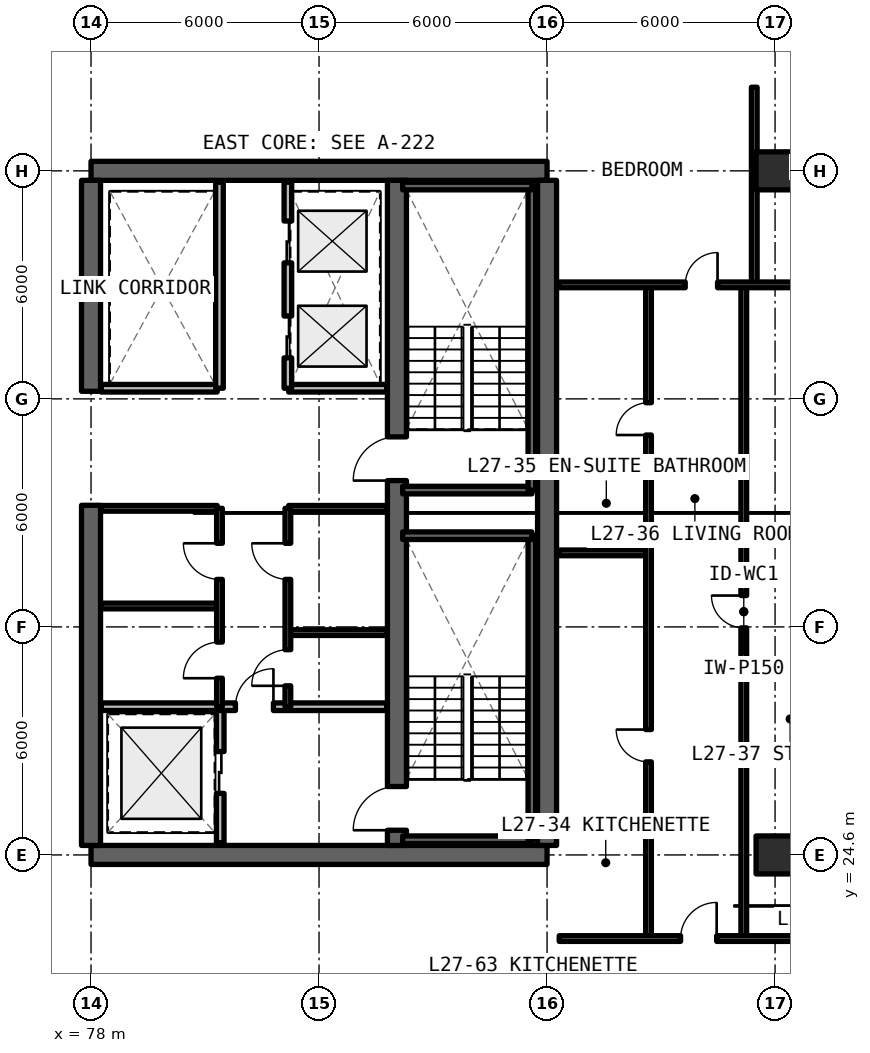
"""IFC4 building model, lengths in metres.
Left out: names, types, materials, properties, quantities, classifications, styles, units other than length and angle.
Written with IfcOpenShell. Run it as: python <this file> out.ifc"""

import sys

from ifc_helpers import new_model, si_unit, direction, frame, frame_2d, origin, origin_2d, place, context, subcontext, project, spatial, rectangle, extrude, element, fill, save


model = new_model("IFC4")
c1 = context("Model", 3, precision=1e-05, world=origin(), true_north=direction((0.0, 1.0)))
c2 = subcontext(c1, "Body", "Model", "MODEL_VIEW")
j1 = project(units=[si_unit("LENGTHUNIT", "METRE"), si_unit("PLANEANGLEUNIT", "RADIAN")], contexts=[c1])
p1 = place(None, origin())
s1 = spatial("IfcSite", under=j1, at=p1, CompositionType="ELEMENT")
p2 = place(p1, origin())
s2 = spatial("IfcBuilding", under=s1, at=p2, CompositionType="ELEMENT")
p3 = place(p2, frame((0.0, 0.0, 98.67)))
s3 = spatial("IfcBuildingStorey", under=s2, at=p3, CompositionType="ELEMENT", Elevation=98.67)
for number, where, z_axis, x_axis in (
    (1, (78.0, 24.6, 0.0), (0.0, 0.0, 1.0), (1.0, 0.0, 0.0)),
    (2, (90.0, 42.6, 0.0), (0.0, 0.0, 1.0), (-1.0, 0.0, 0.0)),
):
    element("IfcWall", number, at=place(p3, frame(where, z_axis=z_axis, x_axis=x_axis)), inside=s3, PredefinedType="SHEAR", context=c2, shape_type="SweptSolid", body=[
        extrude(rectangle(XDim=12.0, YDim=0.5, at=frame_2d((6.0, 0.0))), origin(), (0.0, 0.0, 1.0), 3.3),
    ])
p4 = place(p3, frame((90.0, 24.85, 0.0), z_axis=(0.0, 0.0, 1.0), x_axis=(0.0, 1.0, 0.0)))
e3 = element("IfcWall", 3, at=p4, inside=s3, PredefinedType="SHEAR", context=c2, shape_type="SweptSolid", body=[
    extrude(rectangle(XDim=17.5, YDim=0.5, at=frame_2d((8.75, 0.0))), origin(), (0.0, 0.0, 1.0), 3.3),
])
p5 = place(p3, frame((78.0, 24.85, 0.0), z_axis=(0.0, 0.0, 1.0), x_axis=(0.0, 1.0, 0.0)))
e4 = element("IfcWall", 4, at=p5, inside=s3, PredefinedType="SHEAR", context=c2, shape_type="SweptSolid", body=[
    extrude(rectangle(XDim=8.95, YDim=0.5, at=frame_2d((4.475, 0.0))), origin(), (0.0, 0.0, 1.0), 3.3),
])
p6 = place(p3, frame((78.0, 36.8, 0.0), z_axis=(0.0, 0.0, 1.0), x_axis=(0.0, 1.0, 0.0)))
e5 = element("IfcWall", 5, at=p6, inside=s3, PredefinedType="SHEAR", context=c2, shape_type="SweptSolid", body=[
    extrude(rectangle(XDim=5.55, YDim=0.5, at=frame_2d((2.775, 0.0))), origin(), (0.0, 0.0, 1.0), 3.3),
])
p7 = place(p3, frame((86.05, 24.85, 0.0), z_axis=(0.0, 0.0, 1.0), x_axis=(0.0, 1.0, 0.0)))
e6 = element("IfcWall", 6, at=p7, inside=s3, PredefinedType="SHEAR", context=c2, shape_type="SweptSolid", body=[
    extrude(rectangle(XDim=17.5, YDim=0.5, at=frame_2d((8.75, 0.0))), origin(), (0.0, 0.0, 1.0), 3.3),
])
p8 = place(p7, frame((0.4, 0.0, 0.0)))
e7 = element("IfcOpeningElement", 7, at=p8, cuts=e6, PredefinedType="OPENING", context=c2, shape_type="SweptSolid", body=[
    extrude(rectangle(XDim=1.15, YDim=2.15, at=frame_2d((0.575, 1.075))), frame((0.0, 0.26, 0.0), z_axis=(0.0, -1.0, 0.0), x_axis=(1.0, 0.0, 0.0)), (0.0, 0.0, 1.0), 0.52),
])
p9 = place(p7, frame((9.6, 0.0, 0.0)))
e8 = element("IfcOpeningElement", 8, at=p9, cuts=e6, PredefinedType="OPENING", context=c2, shape_type="SweptSolid", body=[
    extrude(rectangle(XDim=1.15, YDim=2.15, at=frame_2d((0.575, 1.075))), frame((0.0, 0.26, 0.0), z_axis=(0.0, -1.0, 0.0), x_axis=(1.0, 0.0, 0.0)), (0.0, 0.0, 1.0), 0.52),
])
for number, where, z_axis, x_axis in (
    (9, (96.0, 24.6, 0.0), (0.0, 0.0, 1.0), (1.0, 0.0, 0.0)),
    (10, (96.0, 42.6, 0.0), (0.0, 0.0, 1.0), (1.0, 0.0, 0.0)),
):
    element("IfcColumn", number, at=place(p3, frame(where, z_axis=z_axis, x_axis=x_axis)), inside=s3, PredefinedType="COLUMN", context=c2, shape_type="SweptSolid", body=[
        extrude(rectangle(XDim=1.0, YDim=1.0, at=origin_2d()), origin(), (0.0, 0.0, 1.0), 3.3),
    ])
p10 = place(p3, frame((81.4, 24.92, 0.0), z_axis=(0.0, 0.0, 1.0), x_axis=(0.0, 1.0, 0.0)))
e11 = element("IfcWall", 11, at=p10, inside=s3, PredefinedType="SOLIDWALL", context=c2, shape_type="SweptSolid", body=[
    extrude(rectangle(XDim=3.58, YDim=0.2, at=frame_2d((1.79, 0.0))), origin(), (0.0, 0.0, 1.0), 2.35),
])
p11 = place(p10, frame((1.3, 0.0, 0.0)))
e12 = element("IfcOpeningElement", 12, at=p11, cuts=e11, PredefinedType="OPENING", context=c2, shape_type="SweptSolid", body=[
    extrude(rectangle(XDim=1.1, YDim=2.2, at=frame_2d((0.55, 1.1))), frame((0.0, 0.11, 0.0), z_axis=(0.0, -1.0, 0.0), x_axis=(1.0, 0.0, 0.0)), (0.0, 0.0, 1.0), 0.22),
])
p12 = place(p3, frame((78.27, 28.5, 0.0), z_axis=(0.0, 0.0, 1.0), x_axis=(1.0, 0.0, 0.0)))
e13 = element("IfcWall", 13, at=p12, inside=s3, PredefinedType="SOLIDWALL", context=c2, shape_type="SweptSolid", body=[
    extrude(rectangle(XDim=7.51, YDim=0.2, at=frame_2d((3.755, 0.0))), origin(), (0.0, 0.0, 1.0), 2.35),
])
p13 = place(p12, frame((3.53, 0.0, 0.0)))
e14 = element("IfcOpeningElement", 14, at=p13, cuts=e13, PredefinedType="OPENING", context=c2, shape_type="SweptSolid", body=[
    extrude(rectangle(XDim=1.0, YDim=2.15, at=frame_2d((0.5, 1.075))), frame((0.0, 0.11, 0.0), z_axis=(0.0, -1.0, 0.0), x_axis=(1.0, 0.0, 0.0)), (0.0, 0.0, 1.0), 0.22),
])
for number, where, z_axis, x_axis in (
    (15, (83.2, 30.45, 0.0), (0.0, 0.0, 1.0), (1.0, 0.0, 0.0)),
    (16, (83.2, 33.72, 0.0), (0.0, 0.0, 1.0), (1.0, 0.0, 0.0)),
):
    element("IfcWall", number, at=place(p3, frame(where, z_axis=z_axis, x_axis=x_axis)), inside=s3, PredefinedType="SOLIDWALL", context=c2, shape_type="SweptSolid", body=[
        extrude(rectangle(XDim=2.58, YDim=0.15, at=frame_2d((1.29, 0.0))), origin(), (0.0, 0.0, 1.0), 2.35),
    ])
p14 = place(p3, frame((83.18, 28.5, 0.0), z_axis=(0.0, 0.0, 1.0), x_axis=(0.0, 1.0, 0.0)))
e17 = element("IfcWall", 17, at=p14, inside=s3, PredefinedType="SOLIDWALL", context=c2, shape_type="SweptSolid", body=[
    extrude(rectangle(XDim=5.22, YDim=0.15, at=frame_2d((2.61, 0.0))), origin(), (0.0, 0.0, 1.0), 2.35),
])
p15 = place(p14, frame((0.55, 0.0, 0.0)))
e18 = element("IfcOpeningElement", 18, at=p15, cuts=e17, PredefinedType="OPENING", context=c2, shape_type="SweptSolid", body=[
    extrude(rectangle(XDim=0.95, YDim=2.15, at=frame_2d((0.475, 1.075))), frame((0.0, 0.085, 0.0), z_axis=(0.0, -1.0, 0.0), x_axis=(1.0, 0.0, 0.0)), (0.0, 0.0, 1.0), 0.17),
])
p16 = place(p14, frame((3.35, 0.0, 0.0)))
e19 = element("IfcOpeningElement", 19, at=p16, cuts=e17, PredefinedType="OPENING", context=c2, shape_type="SweptSolid", body=[
    extrude(rectangle(XDim=0.95, YDim=2.15, at=frame_2d((0.475, 1.075))), frame((0.0, 0.085, 0.0), z_axis=(0.0, -1.0, 0.0), x_axis=(1.0, 0.0, 0.0)), (0.0, 0.0, 1.0), 0.17),
])
for number, where, z_axis, x_axis in (
    (20, (78.27, 31.15, 0.0), (0.0, 0.0, 1.0), (1.0, 0.0, 0.0)),
    (21, (78.27, 33.72, 0.0), (0.0, 0.0, 1.0), (1.0, 0.0, 0.0)),
):
    element("IfcWall", number, at=place(p3, frame(where, z_axis=z_axis, x_axis=x_axis)), inside=s3, PredefinedType="SOLIDWALL", context=c2, shape_type="SweptSolid", body=[
        extrude(rectangle(XDim=3.05, YDim=0.15, at=frame_2d((1.525, 0.0))), origin(), (0.0, 0.0, 1.0), 2.35),
    ])
p17 = place(p3, frame((81.38, 28.5, 0.0), z_axis=(0.0, 0.0, 1.0), x_axis=(0.0, 1.0, 0.0)))
e22 = element("IfcWall", 22, at=p17, inside=s3, PredefinedType="SOLIDWALL", context=c2, shape_type="SweptSolid", body=[
    extrude(rectangle(XDim=5.22, YDim=0.15, at=frame_2d((2.61, 0.0))), origin(), (0.0, 0.0, 1.0), 2.35),
])
p18 = place(p17, frame((0.75, 0.0, 0.0)))
e23 = element("IfcOpeningElement", 23, at=p18, cuts=e22, PredefinedType="OPENING", context=c2, shape_type="SweptSolid", body=[
    extrude(rectangle(XDim=0.95, YDim=2.15, at=frame_2d((0.475, 1.075))), frame((0.0, 0.085, 0.0), z_axis=(0.0, -1.0, 0.0), x_axis=(1.0, 0.0, 0.0)), (0.0, 0.0, 1.0), 0.17),
])
p19 = place(p17, frame((3.35, 0.0, 0.0)))
e24 = element("IfcOpeningElement", 24, at=p19, cuts=e22, PredefinedType="OPENING", context=c2, shape_type="SweptSolid", body=[
    extrude(rectangle(XDim=0.95, YDim=2.15, at=frame_2d((0.475, 1.075))), frame((0.0, 0.085, 0.0), z_axis=(0.0, -1.0, 0.0), x_axis=(1.0, 0.0, 0.0)), (0.0, 0.0, 1.0), 0.17),
])
p20 = place(p3, frame((83.2, 36.88, 0.0), z_axis=(0.0, 0.0, 1.0), x_axis=(1.0, 0.0, 0.0)))
e25 = element("IfcWall", 25, at=p20, inside=s3, PredefinedType="SOLIDWALL", context=c2, shape_type="SweptSolid", body=[
    extrude(rectangle(XDim=2.58, YDim=0.2, at=frame_2d((1.29, 0.0))), origin(), (0.0, 0.0, 1.0), 2.35),
])
p21 = place(p3, frame((83.18, 36.88, 0.0), z_axis=(0.0, 0.0, 1.0), x_axis=(0.0, 1.0, 0.0)))
e26 = element("IfcWall", 26, at=p21, inside=s3, PredefinedType="SOLIDWALL", context=c2, shape_type="SweptSolid", body=[
    extrude(rectangle(XDim=5.42, YDim=0.2, at=frame_2d((2.71, 0.0))), origin(), (0.0, 0.0, 1.0), 2.35),
])
p22 = place(p21, frame((0.8, 0.0, 0.0)))
e27 = element("IfcOpeningElement", 27, at=p22, cuts=e26, PredefinedType="OPENING", context=c2, shape_type="SweptSolid", body=[
    extrude(rectangle(XDim=1.1, YDim=2.2, at=frame_2d((0.55, 1.1))), frame((0.0, 0.11, 0.0), z_axis=(0.0, -1.0, 0.0), x_axis=(1.0, 0.0, 0.0)), (0.0, 0.0, 1.0), 0.22),
])
p23 = place(p21, frame((3.3, 0.0, 0.0)))
e28 = element("IfcOpeningElement", 28, at=p23, cuts=e26, PredefinedType="OPENING", context=c2, shape_type="SweptSolid", body=[
    extrude(rectangle(XDim=1.1, YDim=2.2, at=frame_2d((0.55, 1.1))), frame((0.0, 0.11, 0.0), z_axis=(0.0, -1.0, 0.0), x_axis=(1.0, 0.0, 0.0)), (0.0, 0.0, 1.0), 0.22),
])
p24 = place(p3, frame((78.27, 36.88, 0.0), z_axis=(0.0, 0.0, 1.0), x_axis=(1.0, 0.0, 0.0)))
e29 = element("IfcWall", 29, at=p24, inside=s3, PredefinedType="SOLIDWALL", context=c2, shape_type="SweptSolid", body=[
    extrude(rectangle(XDim=3.05, YDim=0.2, at=frame_2d((1.525, 0.0))), origin(), (0.0, 0.0, 1.0), 2.35),
])
p25 = place(p3, frame((81.38, 36.88, 0.0), z_axis=(0.0, 0.0, 1.0), x_axis=(0.0, 1.0, 0.0)))
e30 = element("IfcWall", 30, at=p25, inside=s3, PredefinedType="SOLIDWALL", context=c2, shape_type="SweptSolid", body=[
    extrude(rectangle(XDim=5.42, YDim=0.2, at=frame_2d((2.71, 0.0))), origin(), (0.0, 0.0, 1.0), 2.35),
])
p26 = place(p3, frame((95.177, 22.4, 0.0), z_axis=(0.0, 0.0, 1.0), x_axis=(0.0, 1.0, 0.0)))
e31 = element("IfcWall", 31, at=p26, inside=s3, PredefinedType="PARTITIONING", context=c2, shape_type="SweptSolid", body=[
    extrude(rectangle(XDim=17.2, YDim=0.15, at=frame_2d((8.6, 0.0))), origin(), (0.0, 0.0, 1.0), 2.35),
])
p27 = place(p26, frame((8.175, 0.0, 0.0)))
e32 = element("IfcOpeningElement", 32, at=p27, cuts=e31, PredefinedType="OPENING", context=c2, shape_type="SweptSolid", body=[
    extrude(rectangle(XDim=0.85, YDim=2.1, at=frame_2d((0.425, 1.05))), frame((0.0, 0.085, 0.0), z_axis=(0.0, -1.0, 0.0), x_axis=(1.0, 0.0, 0.0)), (0.0, 0.0, 1.0), 0.17),
])
p28 = place(p3, frame((90.32, 32.548, 0.0), z_axis=(0.0, 0.0, 1.0), x_axis=(1.0, 0.0, 0.0)))
e33 = element("IfcWall", 33, at=p28, inside=s3, PredefinedType="PARTITIONING", context=c2, shape_type="SweptSolid", body=[
    extrude(rectangle(XDim=2.35, YDim=0.15, at=frame_2d((1.175, 0.0))), origin(), (0.0, 0.0, 1.0), 2.35),
])
p29 = place(p3, frame((92.67, 22.4, 0.0), z_axis=(0.0, 0.0, 1.0), x_axis=(0.0, 1.0, 0.0)))
e34 = element("IfcWall", 34, at=p29, inside=s3, PredefinedType="PARTITIONING", context=c2, shape_type="SweptSolid", body=[
    extrude(rectangle(XDim=17.2, YDim=0.15, at=frame_2d((8.6, 0.0))), origin(), (0.0, 0.0, 1.0), 2.35),
])
p30 = place(p29, frame((4.649, 0.0, 0.0)))
e35 = element("IfcOpeningElement", 35, at=p30, cuts=e34, PredefinedType="OPENING", context=c2, shape_type="SweptSolid", body=[
    extrude(rectangle(XDim=0.85, YDim=2.1, at=frame_2d((0.425, 1.05))), frame((0.0, 0.085, 0.0), z_axis=(0.0, -1.0, 0.0), x_axis=(1.0, 0.0, 0.0)), (0.0, 0.0, 1.0), 0.17),
])
p31 = place(p29, frame((13.249, 0.0, 0.0)))
e36 = element("IfcOpeningElement", 36, at=p31, cuts=e34, PredefinedType="OPENING", context=c2, shape_type="SweptSolid", body=[
    extrude(rectangle(XDim=0.85, YDim=2.1, at=frame_2d((0.425, 1.05))), frame((0.0, 0.085, 0.0), z_axis=(0.0, -1.0, 0.0), x_axis=(1.0, 0.0, 0.0)), (0.0, 0.0, 1.0), 0.17),
])
p32 = place(p3, frame((95.452, 39.6, 0.0), z_axis=(0.0, 0.0, 1.0), x_axis=(0.0, 1.0, 0.0)))
e37 = element("IfcWall", 37, at=p32, inside=s3, PredefinedType="PARTITIONING", context=c2, shape_type="SweptSolid", body=[
    extrude(rectangle(XDim=5.2, YDim=0.15, at=frame_2d((2.6, 0.0))), origin(), (0.0, 0.0, 1.0), 2.35),
])
p33 = place(p3, frame((90.32, 39.6, 0.0), z_axis=(0.0, 0.0, 1.0), x_axis=(1.0, 0.0, 0.0)))
e38 = element("IfcWall", 38, at=p33, inside=s3, PredefinedType="PARTITIONING", context=c2, shape_type="SweptSolid", body=[
    extrude(rectangle(XDim=9.87, YDim=0.15, at=frame_2d((4.935, 0.0))), origin(), (0.0, 0.0, 1.0), 2.35),
])
p34 = place(p33, frame((3.316, 0.0, 0.0)))
e39 = element("IfcOpeningElement", 39, at=p34, cuts=e38, PredefinedType="OPENING", context=c2, shape_type="SweptSolid", body=[
    extrude(rectangle(XDim=0.85, YDim=2.1, at=frame_2d((0.425, 1.05))), frame((0.0, 0.085, 0.0), z_axis=(0.0, -1.0, 0.0), x_axis=(1.0, 0.0, 0.0)), (0.0, 0.0, 1.0), 0.17),
])
p35 = place(p33, frame((7.876, 0.0, 0.0)))
e40 = element("IfcOpeningElement", 40, at=p35, cuts=e38, PredefinedType="OPENING", context=c2, shape_type="SweptSolid", body=[
    extrude(rectangle(XDim=0.85, YDim=2.1, at=frame_2d((0.425, 1.05))), frame((0.0, 0.085, 0.0), z_axis=(0.0, -1.0, 0.0), x_axis=(1.0, 0.0, 0.0)), (0.0, 0.0, 1.0), 0.17),
])
p36 = place(p3, frame((90.32, 22.4, 0.0), z_axis=(0.0, 0.0, 1.0), x_axis=(1.0, 0.0, 0.0)))
e41 = element("IfcWall", 41, at=p36, inside=s3, PredefinedType="SOLIDWALL", context=c2, shape_type="SweptSolid", body=[
    extrude(rectangle(XDim=9.87, YDim=0.15, at=frame_2d((4.935, 0.0))), origin(), (0.0, 0.0, 1.0), 2.35),
])
p37 = place(p36, frame((3.193, 0.0, 0.0)))
e42 = element("IfcOpeningElement", 42, at=p37, cuts=e41, PredefinedType="OPENING", context=c2, shape_type="SweptSolid", body=[
    extrude(rectangle(XDim=0.95, YDim=2.15, at=frame_2d((0.475, 1.075))), frame((0.0, 0.085, 0.0), z_axis=(0.0, -1.0, 0.0), x_axis=(1.0, 0.0, 0.0)), (0.0, 0.0, 1.0), 0.17),
])
p38 = place(p3, frame((86.2, 25.0, 0.0), z_axis=(0.0, 0.0, 1.0), x_axis=(1.0, 0.0, 0.0)))
e43 = element("IfcWall", 43, at=p38, inside=s3, PredefinedType="SOLIDWALL", context=c2, shape_type="SweptSolid", body=[
    extrude(rectangle(XDim=3.4, YDim=0.2, at=frame_2d((1.7, 0.0))), origin(), (0.0, 0.0, 1.0), 3.3),
])
p39 = place(p3, frame((89.6, 25.0, 0.0), z_axis=(0.0, 0.0, 1.0), x_axis=(0.0, 1.0, 0.0)))
e44 = element("IfcWall", 44, at=p39, inside=s3, PredefinedType="SOLIDWALL", context=c2, shape_type="SweptSolid", body=[
    extrude(rectangle(XDim=8.0, YDim=0.2, at=frame_2d((4.0, 0.0))), origin(), (0.0, 0.0, 1.0), 3.3),
])
for number, where, z_axis, x_axis in (
    (45, (89.6, 33.0, 0.0), (0.0, 0.0, 1.0), (-1.0, 0.0, 0.0)),
    (46, (86.2, 34.2, 0.0), (0.0, 0.0, 1.0), (1.0, 0.0, 0.0)),
):
    element("IfcWall", number, at=place(p3, frame(where, z_axis=z_axis, x_axis=x_axis)), inside=s3, PredefinedType="SOLIDWALL", context=c2, shape_type="SweptSolid", body=[
        extrude(rectangle(XDim=3.4, YDim=0.2, at=frame_2d((1.7, 0.0))), origin(), (0.0, 0.0, 1.0), 3.3),
    ])
p40 = place(p3, frame((89.6, 34.2, 0.0), z_axis=(0.0, 0.0, 1.0), x_axis=(0.0, 1.0, 0.0)))
e47 = element("IfcWall", 47, at=p40, inside=s3, PredefinedType="SOLIDWALL", context=c2, shape_type="SweptSolid", body=[
    extrude(rectangle(XDim=8.0, YDim=0.2, at=frame_2d((4.0, 0.0))), origin(), (0.0, 0.0, 1.0), 3.3),
])
p41 = place(p3, frame((89.6, 42.2, 0.0), z_axis=(0.0, 0.0, 1.0), x_axis=(-1.0, 0.0, 0.0)))
e48 = element("IfcWall", 48, at=p41, inside=s3, PredefinedType="SOLIDWALL", context=c2, shape_type="SweptSolid", body=[
    extrude(rectangle(XDim=3.4, YDim=0.2, at=frame_2d((1.7, 0.0))), origin(), (0.0, 0.0, 1.0), 3.3),
])
p42 = place(p11, origin())
e49 = element("IfcDoor", 49, at=p42, inside=s3, OperationType="SLIDING_TO_LEFT", PredefinedType="DOOR", context=c2, shape_type="SweptSolid", body=[
    extrude(rectangle(XDim=1.1, YDim=2.2, at=frame_2d((0.55, 1.1))), frame((0.0, 0.025, 0.0), z_axis=(0.0, -1.0, 0.0), x_axis=(1.0, 0.0, 0.0)), (0.0, 0.0, 1.0), 0.05),
])
fill(e12, e49)
p43 = place(p13, origin())
e50 = element("IfcDoor", 50, at=p43, inside=s3, OperationType="SINGLE_SWING_RIGHT", PredefinedType="DOOR", context=c2, shape_type="SweptSolid", body=[
    extrude(rectangle(XDim=1.0, YDim=2.15, at=frame_2d((0.5, 1.075))), frame((0.0, 0.025, 0.0), z_axis=(0.0, -1.0, 0.0), x_axis=(1.0, 0.0, 0.0)), (0.0, 0.0, 1.0), 0.05),
])
fill(e14, e50)
p44 = place(p15, origin())
e51 = element("IfcDoor", 51, at=p44, inside=s3, OperationType="SINGLE_SWING_LEFT", PredefinedType="DOOR", context=c2, shape_type="SweptSolid", body=[
    extrude(rectangle(XDim=0.95, YDim=2.15, at=frame_2d((0.475, 1.075))), frame((0.0, 0.025, 0.0), z_axis=(0.0, -1.0, 0.0), x_axis=(1.0, 0.0, 0.0)), (0.0, 0.0, 1.0), 0.05),
])
fill(e18, e51)
p45 = place(p16, origin())
e52 = element("IfcDoor", 52, at=p45, inside=s3, OperationType="SINGLE_SWING_RIGHT", PredefinedType="DOOR", context=c2, shape_type="SweptSolid", body=[
    extrude(rectangle(XDim=0.95, YDim=2.15, at=frame_2d((0.475, 1.075))), frame((0.0, 0.025, 0.0), z_axis=(0.0, -1.0, 0.0), x_axis=(1.0, 0.0, 0.0)), (0.0, 0.0, 1.0), 0.05),
])
fill(e19, e52)
p46 = place(p18, origin())
e53 = element("IfcDoor", 53, at=p46, inside=s3, OperationType="SINGLE_SWING_LEFT", PredefinedType="DOOR", context=c2, shape_type="SweptSolid", body=[
    extrude(rectangle(XDim=0.95, YDim=2.15, at=frame_2d((0.475, 1.075))), frame((0.0, 0.025, 0.0), z_axis=(0.0, -1.0, 0.0), x_axis=(1.0, 0.0, 0.0)), (0.0, 0.0, 1.0), 0.05),
])
fill(e23, e53)
p47 = place(p19, origin())
e54 = element("IfcDoor", 54, at=p47, inside=s3, OperationType="SINGLE_SWING_RIGHT", PredefinedType="DOOR", context=c2, shape_type="SweptSolid", body=[
    extrude(rectangle(XDim=0.95, YDim=2.15, at=frame_2d((0.475, 1.075))), frame((0.0, 0.025, 0.0), z_axis=(0.0, -1.0, 0.0), x_axis=(1.0, 0.0, 0.0)), (0.0, 0.0, 1.0), 0.05),
])
fill(e24, e54)
p48 = place(p22, origin())
e55 = element("IfcDoor", 55, at=p48, inside=s3, OperationType="SLIDING_TO_LEFT", PredefinedType="DOOR", context=c2, shape_type="SweptSolid", body=[
    extrude(rectangle(XDim=1.1, YDim=2.2, at=frame_2d((0.55, 1.1))), frame((0.0, 0.025, 0.0), z_axis=(0.0, -1.0, 0.0), x_axis=(1.0, 0.0, 0.0)), (0.0, 0.0, 1.0), 0.05),
])
fill(e27, e55)
p49 = place(p23, origin())
e56 = element("IfcDoor", 56, at=p49, inside=s3, OperationType="SLIDING_TO_RIGHT", PredefinedType="DOOR", context=c2, shape_type="SweptSolid", body=[
    extrude(rectangle(XDim=1.1, YDim=2.2, at=frame_2d((0.55, 1.1))), frame((0.0, 0.025, 0.0), z_axis=(0.0, -1.0, 0.0), x_axis=(1.0, 0.0, 0.0)), (0.0, 0.0, 1.0), 0.05),
])
fill(e28, e56)
p50 = place(p27, origin())
e57 = element("IfcDoor", 57, at=p50, inside=s3, OperationType="SINGLE_SWING_RIGHT", PredefinedType="DOOR", context=c2, shape_type="SweptSolid", body=[
    extrude(rectangle(XDim=0.85, YDim=2.1, at=frame_2d((0.425, 1.05))), frame((0.0, 0.025, 0.0), z_axis=(0.0, -1.0, 0.0), x_axis=(1.0, 0.0, 0.0)), (0.0, 0.0, 1.0), 0.05),
])
fill(e32, e57)
p51 = place(p30, origin())
e58 = element("IfcDoor", 58, at=p51, inside=s3, OperationType="SINGLE_SWING_RIGHT", PredefinedType="DOOR", context=c2, shape_type="SweptSolid", body=[
    extrude(rectangle(XDim=0.85, YDim=2.1, at=frame_2d((0.425, 1.05))), frame((0.0, 0.025, 0.0), z_axis=(0.0, -1.0, 0.0), x_axis=(1.0, 0.0, 0.0)), (0.0, 0.0, 1.0), 0.05),
])
fill(e35, e58)
p52 = place(p31, origin())
e59 = element("IfcDoor", 59, at=p52, inside=s3, OperationType="SINGLE_SWING_LEFT", PredefinedType="DOOR", context=c2, shape_type="SweptSolid", body=[
    extrude(rectangle(XDim=0.85, YDim=2.1, at=frame_2d((0.425, 1.05))), frame((0.0, 0.025, 0.0), z_axis=(0.0, -1.0, 0.0), x_axis=(1.0, 0.0, 0.0)), (0.0, 0.0, 1.0), 0.05),
])
fill(e36, e59)
p53 = place(p34, origin())
e60 = element("IfcDoor", 60, at=p53, inside=s3, OperationType="SINGLE_SWING_RIGHT", PredefinedType="DOOR", context=c2, shape_type="SweptSolid", body=[
    extrude(rectangle(XDim=0.85, YDim=2.1, at=frame_2d((0.425, 1.05))), frame((0.0, 0.025, 0.0), z_axis=(0.0, -1.0, 0.0), x_axis=(1.0, 0.0, 0.0)), (0.0, 0.0, 1.0), 0.05),
])
fill(e39, e60)
p54 = place(p37, origin())
e61 = element("IfcDoor", 61, at=p54, inside=s3, OperationType="SINGLE_SWING_RIGHT", PredefinedType="DOOR", context=c2, shape_type="SweptSolid", body=[
    extrude(rectangle(XDim=0.95, YDim=2.15, at=frame_2d((0.475, 1.075))), frame((0.0, 0.025, 0.0), z_axis=(0.0, -1.0, 0.0), x_axis=(1.0, 0.0, 0.0)), (0.0, 0.0, 1.0), 0.05),
])
fill(e42, e61)
p55 = place(p8, origin())
e62 = element("IfcDoor", 62, at=p55, inside=s3, OperationType="SINGLE_SWING_RIGHT", PredefinedType="DOOR", context=c2, shape_type="SweptSolid", body=[
    extrude(rectangle(XDim=1.15, YDim=2.15, at=frame_2d((0.575, 1.075))), frame((0.0, 0.025, 0.0), z_axis=(0.0, -1.0, 0.0), x_axis=(1.0, 0.0, 0.0)), (0.0, 0.0, 1.0), 0.05),
])
fill(e7, e62)
p56 = place(p9, origin())
e63 = element("IfcDoor", 63, at=p56, inside=s3, OperationType="SINGLE_SWING_LEFT", PredefinedType="DOOR", context=c2, shape_type="SweptSolid", body=[
    extrude(rectangle(XDim=1.15, YDim=2.15, at=frame_2d((0.575, 1.075))), frame((0.0, 0.025, 0.0), z_axis=(0.0, -1.0, 0.0), x_axis=(1.0, 0.0, 0.0)), (0.0, 0.0, 1.0), 0.05),
])
fill(e8, e63)
save(model, sys.argv[1])
